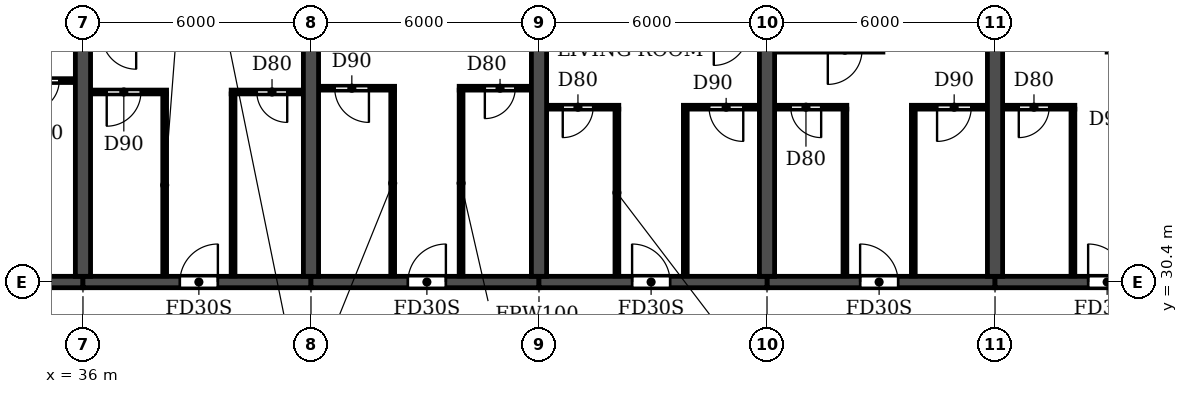
"""IFC4 building model, lengths in metres.
Left out: names, types, materials, properties, quantities, classifications, styles, units other than length and angle.
Written with IfcOpenShell. Run it as: python <this file> out.ifc"""

import sys

from ifc_helpers import new_model, si_unit, direction, frame, frame_2d, origin, place, context, subcontext, project, spatial, rectangle, extrude, element, fill, save


model = new_model("IFC4")
c1 = context("Model", 3, precision=1e-05, world=origin(), true_north=direction((0.0, 1.0)))
c2 = subcontext(c1, "Body", "Model", "MODEL_VIEW")
j1 = project(units=[si_unit("LENGTHUNIT", "METRE"), si_unit("PLANEANGLEUNIT", "RADIAN")], contexts=[c1])
p1 = place(None, origin())
s1 = spatial("IfcSite", under=j1, at=p1, CompositionType="ELEMENT")
p2 = place(p1, origin())
s2 = spatial("IfcBuilding", under=s1, at=p2, CompositionType="ELEMENT")
p3 = place(p2, frame((0.0, 0.0, 26.7)))
s3 = spatial("IfcBuildingStorey", under=s2, at=p3, CompositionType="ELEMENT", Elevation=26.7)
for number, where, z_axis, x_axis in (
    (1, (36.0, 30.55, 0.0), (0.0, 0.0, 1.0), (0.0, 1.0, 0.0)),
    (2, (42.0, 30.55, 0.0), (0.0, 0.0, 1.0), (0.0, 1.0, 0.0)),
    (3, (48.0, 30.55, 0.0), (0.0, 0.0, 1.0), (0.0, 1.0, 0.0)),
    (4, (54.0, 30.55, 0.0), (0.0, 0.0, 1.0), (0.0, 1.0, 0.0)),
    (5, (60.0, 30.55, 0.0), (0.0, 0.0, 1.0), (0.0, 1.0, 0.0)),
):
    element("IfcWall", number, at=place(p3, frame(where, z_axis=z_axis, x_axis=x_axis)), inside=s3, PredefinedType="SHEAR", context=c2, shape_type="SweptSolid", body=[
        extrude(rectangle(XDim=14.05, YDim=0.4, at=frame_2d((7.025, 0.0))), origin(), (0.0, 0.0, 1.0), 3.05),
    ])
p4 = place(p3, frame((30.0, 30.4, 0.0), z_axis=(0.0, 0.0, 1.0), x_axis=(1.0, 0.0, 0.0)))
e6 = element("IfcWall", 6, at=p4, inside=s3, PredefinedType="SHEAR", context=c2, shape_type="SweptSolid", body=[
    extrude(rectangle(XDim=6.0, YDim=0.3, at=frame_2d((3.0, 0.0))), origin(), (0.0, 0.0, 1.0), 2.45),
])
p5 = place(p4, frame((2.55, 0.0, 0.0)))
e7 = element("IfcOpeningElement", 7, at=p5, cuts=e6, PredefinedType="OPENING", context=c2, shape_type="SweptSolid", body=[
    extrude(rectangle(XDim=1.0, YDim=2.1, at=frame_2d((0.5, 1.05))), frame((0.0, 0.16, 0.0), z_axis=(0.0, -1.0, 0.0), x_axis=(1.0, 0.0, 0.0)), (0.0, 0.0, 1.0), 0.32),
])
p6 = place(p3, frame((36.0, 30.4, 0.0), z_axis=(0.0, 0.0, 1.0), x_axis=(1.0, 0.0, 0.0)))
e8 = element("IfcWall", 8, at=p6, inside=s3, PredefinedType="SHEAR", context=c2, shape_type="SweptSolid", body=[
    extrude(rectangle(XDim=6.0, YDim=0.3, at=frame_2d((3.0, 0.0))), origin(), (0.0, 0.0, 1.0), 2.45),
])
p7 = place(p6, frame((2.55, 0.0, 0.0)))
e9 = element("IfcOpeningElement", 9, at=p7, cuts=e8, PredefinedType="OPENING", context=c2, shape_type="SweptSolid", body=[
    extrude(rectangle(XDim=1.0, YDim=2.1, at=frame_2d((0.5, 1.05))), frame((0.0, 0.16, 0.0), z_axis=(0.0, -1.0, 0.0), x_axis=(1.0, 0.0, 0.0)), (0.0, 0.0, 1.0), 0.32),
])
p8 = place(p3, frame((42.0, 30.4, 0.0), z_axis=(0.0, 0.0, 1.0), x_axis=(1.0, 0.0, 0.0)))
e10 = element("IfcWall", 10, at=p8, inside=s3, PredefinedType="SHEAR", context=c2, shape_type="SweptSolid", body=[
    extrude(rectangle(XDim=6.0, YDim=0.3, at=frame_2d((3.0, 0.0))), origin(), (0.0, 0.0, 1.0), 2.45),
])
p9 = place(p8, frame((2.55, 0.0, 0.0)))
e11 = element("IfcOpeningElement", 11, at=p9, cuts=e10, PredefinedType="OPENING", context=c2, shape_type="SweptSolid", body=[
    extrude(rectangle(XDim=1.0, YDim=2.1, at=frame_2d((0.5, 1.05))), frame((0.0, 0.16, 0.0), z_axis=(0.0, -1.0, 0.0), x_axis=(1.0, 0.0, 0.0)), (0.0, 0.0, 1.0), 0.32),
])
p10 = place(p3, frame((48.0, 30.4, 0.0), z_axis=(0.0, 0.0, 1.0), x_axis=(1.0, 0.0, 0.0)))
e12 = element("IfcWall", 12, at=p10, inside=s3, PredefinedType="SHEAR", context=c2, shape_type="SweptSolid", body=[
    extrude(rectangle(XDim=6.0, YDim=0.3, at=frame_2d((3.0, 0.0))), origin(), (0.0, 0.0, 1.0), 2.45),
])
p11 = place(p10, frame((2.45, 0.0, 0.0)))
e13 = element("IfcOpeningElement", 13, at=p11, cuts=e12, PredefinedType="OPENING", context=c2, shape_type="SweptSolid", body=[
    extrude(rectangle(XDim=1.0, YDim=2.1, at=frame_2d((0.5, 1.05))), frame((0.0, 0.16, 0.0), z_axis=(0.0, -1.0, 0.0), x_axis=(1.0, 0.0, 0.0)), (0.0, 0.0, 1.0), 0.32),
])
p12 = place(p3, frame((54.0, 30.4, 0.0), z_axis=(0.0, 0.0, 1.0), x_axis=(1.0, 0.0, 0.0)))
e14 = element("IfcWall", 14, at=p12, inside=s3, PredefinedType="SHEAR", context=c2, shape_type="SweptSolid", body=[
    extrude(rectangle(XDim=6.0, YDim=0.3, at=frame_2d((3.0, 0.0))), origin(), (0.0, 0.0, 1.0), 2.45),
])
p13 = place(p12, frame((2.45, 0.0, 0.0)))
e15 = element("IfcOpeningElement", 15, at=p13, cuts=e14, PredefinedType="OPENING", context=c2, shape_type="SweptSolid", body=[
    extrude(rectangle(XDim=1.0, YDim=2.1, at=frame_2d((0.5, 1.05))), frame((0.0, 0.16, 0.0), z_axis=(0.0, -1.0, 0.0), x_axis=(1.0, 0.0, 0.0)), (0.0, 0.0, 1.0), 0.32),
])
p14 = place(p3, frame((60.0, 30.4, 0.0), z_axis=(0.0, 0.0, 1.0), x_axis=(1.0, 0.0, 0.0)))
e16 = element("IfcWall", 16, at=p14, inside=s3, PredefinedType="SHEAR", context=c2, shape_type="SweptSolid", body=[
    extrude(rectangle(XDim=6.0, YDim=0.3, at=frame_2d((3.0, 0.0))), origin(), (0.0, 0.0, 1.0), 2.45),
])
p15 = place(p14, frame((2.45, 0.0, 0.0)))
e17 = element("IfcOpeningElement", 17, at=p15, cuts=e16, PredefinedType="OPENING", context=c2, shape_type="SweptSolid", body=[
    extrude(rectangle(XDim=1.0, YDim=2.1, at=frame_2d((0.5, 1.05))), frame((0.0, 0.16, 0.0), z_axis=(0.0, -1.0, 0.0), x_axis=(1.0, 0.0, 0.0)), (0.0, 0.0, 1.0), 0.32),
])
p16 = place(p3, frame((48.21, 35.0, 0.0), z_axis=(0.0, 0.0, 1.0), x_axis=(1.0, 0.0, 0.0)))
e18 = element("IfcWall", 18, at=p16, inside=s3, PredefinedType="PARTITIONING", context=c2, shape_type="SweptSolid", body=[
    extrude(rectangle(XDim=1.89, YDim=0.1, at=frame_2d((0.945, 0.0))), origin(), (0.0, 0.0, 1.0), 3.05),
])
p17 = place(p16, frame((0.415, 0.0, 0.0)))
e19 = element("IfcOpeningElement", 19, at=p17, cuts=e18, PredefinedType="OPENING", context=c2, shape_type="SweptSolid", body=[
    extrude(rectangle(XDim=0.8, YDim=2.1, at=frame_2d((0.4, 1.05))), frame((0.0, 0.06, 0.0), z_axis=(0.0, -1.0, 0.0), x_axis=(1.0, 0.0, 0.0)), (0.0, 0.0, 1.0), 0.12),
])
p18 = place(p3, frame((51.8, 35.0, 0.0), z_axis=(0.0, 0.0, 1.0), x_axis=(1.0, 0.0, 0.0)))
e20 = element("IfcWall", 20, at=p18, inside=s3, PredefinedType="PARTITIONING", context=c2, shape_type="SweptSolid", body=[
    extrude(rectangle(XDim=1.99, YDim=0.1, at=frame_2d((0.995, 0.0))), origin(), (0.0, 0.0, 1.0), 3.05),
])
p19 = place(p18, frame((0.675, 0.0, 0.0)))
e21 = element("IfcOpeningElement", 21, at=p19, cuts=e20, PredefinedType="OPENING", context=c2, shape_type="SweptSolid", body=[
    extrude(rectangle(XDim=0.9, YDim=2.1, at=frame_2d((0.45, 1.05))), frame((0.0, 0.06, 0.0), z_axis=(0.0, -1.0, 0.0), x_axis=(1.0, 0.0, 0.0)), (0.0, 0.0, 1.0), 0.12),
])
p20 = place(p3, frame((54.21, 35.0, 0.0), z_axis=(0.0, 0.0, 1.0), x_axis=(1.0, 0.0, 0.0)))
e22 = element("IfcWall", 22, at=p20, inside=s3, PredefinedType="PARTITIONING", context=c2, shape_type="SweptSolid", body=[
    extrude(rectangle(XDim=1.89, YDim=0.1, at=frame_2d((0.945, 0.0))), origin(), (0.0, 0.0, 1.0), 3.05),
])
p21 = place(p20, frame((0.415, 0.0, 0.0)))
e23 = element("IfcOpeningElement", 23, at=p21, cuts=e22, PredefinedType="OPENING", context=c2, shape_type="SweptSolid", body=[
    extrude(rectangle(XDim=0.8, YDim=2.1, at=frame_2d((0.4, 1.05))), frame((0.0, 0.06, 0.0), z_axis=(0.0, -1.0, 0.0), x_axis=(1.0, 0.0, 0.0)), (0.0, 0.0, 1.0), 0.12),
])
p22 = place(p3, frame((57.8, 35.0, 0.0), z_axis=(0.0, 0.0, 1.0), x_axis=(1.0, 0.0, 0.0)))
e24 = element("IfcWall", 24, at=p22, inside=s3, PredefinedType="PARTITIONING", context=c2, shape_type="SweptSolid", body=[
    extrude(rectangle(XDim=1.99, YDim=0.1, at=frame_2d((0.995, 0.0))), origin(), (0.0, 0.0, 1.0), 3.05),
])
p23 = place(p22, frame((0.675, 0.0, 0.0)))
e25 = element("IfcOpeningElement", 25, at=p23, cuts=e24, PredefinedType="OPENING", context=c2, shape_type="SweptSolid", body=[
    extrude(rectangle(XDim=0.9, YDim=2.1, at=frame_2d((0.45, 1.05))), frame((0.0, 0.06, 0.0), z_axis=(0.0, -1.0, 0.0), x_axis=(1.0, 0.0, 0.0)), (0.0, 0.0, 1.0), 0.12),
])
p24 = place(p3, frame((60.21, 35.0, 0.0), z_axis=(0.0, 0.0, 1.0), x_axis=(1.0, 0.0, 0.0)))
e26 = element("IfcWall", 26, at=p24, inside=s3, PredefinedType="PARTITIONING", context=c2, shape_type="SweptSolid", body=[
    extrude(rectangle(XDim=1.89, YDim=0.1, at=frame_2d((0.945, 0.0))), origin(), (0.0, 0.0, 1.0), 3.05),
])
p25 = place(p24, frame((0.415, 0.0, 0.0)))
e27 = element("IfcOpeningElement", 27, at=p25, cuts=e26, PredefinedType="OPENING", context=c2, shape_type="SweptSolid", body=[
    extrude(rectangle(XDim=0.8, YDim=2.1, at=frame_2d((0.4, 1.05))), frame((0.0, 0.06, 0.0), z_axis=(0.0, -1.0, 0.0), x_axis=(1.0, 0.0, 0.0)), (0.0, 0.0, 1.0), 0.12),
])
p26 = place(p3, frame((36.21, 35.4, 0.0), z_axis=(0.0, 0.0, 1.0), x_axis=(1.0, 0.0, 0.0)))
e28 = element("IfcWall", 28, at=p26, inside=s3, PredefinedType="PARTITIONING", context=c2, shape_type="SweptSolid", body=[
    extrude(rectangle(XDim=1.99, YDim=0.1, at=frame_2d((0.995, 0.0))), origin(), (0.0, 0.0, 1.0), 3.05),
])
p27 = place(p26, frame((0.415, 0.0, 0.0)))
e29 = element("IfcOpeningElement", 29, at=p27, cuts=e28, PredefinedType="OPENING", context=c2, shape_type="SweptSolid", body=[
    extrude(rectangle(XDim=0.9, YDim=2.1, at=frame_2d((0.45, 1.05))), frame((0.0, 0.06, 0.0), z_axis=(0.0, -1.0, 0.0), x_axis=(1.0, 0.0, 0.0)), (0.0, 0.0, 1.0), 0.12),
])
p28 = place(p3, frame((39.9, 35.4, 0.0), z_axis=(0.0, 0.0, 1.0), x_axis=(1.0, 0.0, 0.0)))
e30 = element("IfcWall", 30, at=p28, inside=s3, PredefinedType="PARTITIONING", context=c2, shape_type="SweptSolid", body=[
    extrude(rectangle(XDim=1.89, YDim=0.1, at=frame_2d((0.945, 0.0))), origin(), (0.0, 0.0, 1.0), 3.05),
])
p29 = place(p28, frame((0.675, 0.0, 0.0)))
e31 = element("IfcOpeningElement", 31, at=p29, cuts=e30, PredefinedType="OPENING", context=c2, shape_type="SweptSolid", body=[
    extrude(rectangle(XDim=0.8, YDim=2.1, at=frame_2d((0.4, 1.05))), frame((0.0, 0.06, 0.0), z_axis=(0.0, -1.0, 0.0), x_axis=(1.0, 0.0, 0.0)), (0.0, 0.0, 1.0), 0.12),
])
p30 = place(p3, frame((42.21, 35.5, 0.0), z_axis=(0.0, 0.0, 1.0), x_axis=(1.0, 0.0, 0.0)))
e32 = element("IfcWall", 32, at=p30, inside=s3, PredefinedType="PARTITIONING", context=c2, shape_type="SweptSolid", body=[
    extrude(rectangle(XDim=1.99, YDim=0.1, at=frame_2d((0.995, 0.0))), origin(), (0.0, 0.0, 1.0), 3.05),
])
p31 = place(p30, frame((0.415, 0.0, 0.0)))
e33 = element("IfcOpeningElement", 33, at=p31, cuts=e32, PredefinedType="OPENING", context=c2, shape_type="SweptSolid", body=[
    extrude(rectangle(XDim=0.9, YDim=2.1, at=frame_2d((0.45, 1.05))), frame((0.0, 0.06, 0.0), z_axis=(0.0, -1.0, 0.0), x_axis=(1.0, 0.0, 0.0)), (0.0, 0.0, 1.0), 0.12),
])
p32 = place(p3, frame((45.9, 35.5, 0.0), z_axis=(0.0, 0.0, 1.0), x_axis=(1.0, 0.0, 0.0)))
e34 = element("IfcWall", 34, at=p32, inside=s3, PredefinedType="PARTITIONING", context=c2, shape_type="SweptSolid", body=[
    extrude(rectangle(XDim=1.89, YDim=0.1, at=frame_2d((0.945, 0.0))), origin(), (0.0, 0.0, 1.0), 3.05),
])
p33 = place(p32, frame((0.675, 0.0, 0.0)))
e35 = element("IfcOpeningElement", 35, at=p33, cuts=e34, PredefinedType="OPENING", context=c2, shape_type="SweptSolid", body=[
    extrude(rectangle(XDim=0.8, YDim=2.1, at=frame_2d((0.4, 1.05))), frame((0.0, 0.06, 0.0), z_axis=(0.0, -1.0, 0.0), x_axis=(1.0, 0.0, 0.0)), (0.0, 0.0, 1.0), 0.12),
])
p34 = place(p3, frame((33.9, 35.7, 0.0), z_axis=(0.0, 0.0, 1.0), x_axis=(1.0, 0.0, 0.0)))
e36 = element("IfcWall", 36, at=p34, inside=s3, PredefinedType="PARTITIONING", context=c2, shape_type="SweptSolid", body=[
    extrude(rectangle(XDim=1.89, YDim=0.1, at=frame_2d((0.945, 0.0))), origin(), (0.0, 0.0, 1.0), 3.05),
])
p35 = place(p34, frame((0.675, 0.0, 0.0)))
e37 = element("IfcOpeningElement", 37, at=p35, cuts=e36, PredefinedType="OPENING", context=c2, shape_type="SweptSolid", body=[
    extrude(rectangle(XDim=0.8, YDim=2.1, at=frame_2d((0.4, 1.05))), frame((0.0, 0.06, 0.0), z_axis=(0.0, -1.0, 0.0), x_axis=(1.0, 0.0, 0.0)), (0.0, 0.0, 1.0), 0.12),
])
for number, where, z_axis, x_axis in (
    (38, (38.15, 30.56, 0.0), (0.0, 0.0, 1.0), (0.0, 1.0, 0.0)),
    (39, (39.95, 30.56, 0.0), (0.0, 0.0, 1.0), (0.0, 1.0, 0.0)),
):
    element("IfcWall", number, at=place(p3, frame(where, z_axis=z_axis, x_axis=x_axis)), inside=s3, PredefinedType="PARTITIONING", context=c2, shape_type="SweptSolid", body=[
        extrude(rectangle(XDim=4.79, YDim=0.1, at=frame_2d((2.395, 0.0))), origin(), (0.0, 0.0, 1.0), 3.05),
    ])
for number, where, z_axis, x_axis in (
    (40, (44.15, 30.56, 0.0), (0.0, 0.0, 1.0), (0.0, 1.0, 0.0)),
    (41, (45.95, 30.56, 0.0), (0.0, 0.0, 1.0), (0.0, 1.0, 0.0)),
):
    element("IfcWall", number, at=place(p3, frame(where, z_axis=z_axis, x_axis=x_axis)), inside=s3, PredefinedType="PARTITIONING", context=c2, shape_type="SweptSolid", body=[
        extrude(rectangle(XDim=4.89, YDim=0.1, at=frame_2d((2.445, 0.0))), origin(), (0.0, 0.0, 1.0), 3.05),
    ])
for number, where, z_axis, x_axis in (
    (42, (50.05, 30.56, 0.0), (0.0, 0.0, 1.0), (0.0, 1.0, 0.0)),
    (43, (51.85, 30.56, 0.0), (0.0, 0.0, 1.0), (0.0, 1.0, 0.0)),
    (44, (56.05, 30.56, 0.0), (0.0, 0.0, 1.0), (0.0, 1.0, 0.0)),
    (45, (57.85, 30.56, 0.0), (0.0, 0.0, 1.0), (0.0, 1.0, 0.0)),
    (46, (62.05, 30.56, 0.0), (0.0, 0.0, 1.0), (0.0, 1.0, 0.0)),
):
    element("IfcWall", number, at=place(p3, frame(where, z_axis=z_axis, x_axis=x_axis)), inside=s3, PredefinedType="PARTITIONING", context=c2, shape_type="SweptSolid", body=[
        extrude(rectangle(XDim=4.39, YDim=0.1, at=frame_2d((2.195, 0.0))), origin(), (0.0, 0.0, 1.0), 3.05),
    ])
p36 = place(p35, frame((0.8, 0.0, 0.0), z_axis=(0.0, 0.0, 1.0), x_axis=(-1.0, 0.0, 0.0)))
e47 = element("IfcDoor", 47, at=p36, inside=s3, OperationType="SINGLE_SWING_RIGHT", PredefinedType="DOOR", context=c2, shape_type="SweptSolid", body=[
    extrude(rectangle(XDim=0.8, YDim=2.1, at=frame_2d((0.4, 1.05))), frame((0.0, 0.025, 0.0), z_axis=(0.0, -1.0, 0.0), x_axis=(1.0, 0.0, 0.0)), (0.0, 0.0, 1.0), 0.05),
])
fill(e37, e47)
p37 = place(p27, frame((0.9, 0.0, 0.0), z_axis=(0.0, 0.0, 1.0), x_axis=(-1.0, 0.0, 0.0)))
e48 = element("IfcDoor", 48, at=p37, inside=s3, OperationType="SINGLE_SWING_RIGHT", PredefinedType="DOOR", context=c2, shape_type="SweptSolid", body=[
    extrude(rectangle(XDim=0.9, YDim=2.1, at=frame_2d((0.45, 1.05))), frame((0.0, 0.025, 0.0), z_axis=(0.0, -1.0, 0.0), x_axis=(1.0, 0.0, 0.0)), (0.0, 0.0, 1.0), 0.05),
])
fill(e29, e48)
p38 = place(p7, origin())
e49 = element("IfcDoor", 49, at=p38, inside=s3, OperationType="SINGLE_SWING_RIGHT", PredefinedType="DOOR", context=c2, shape_type="SweptSolid", body=[
    extrude(rectangle(XDim=1.0, YDim=2.1, at=frame_2d((0.5, 1.05))), frame((0.0, 0.025, 0.0), z_axis=(0.0, -1.0, 0.0), x_axis=(1.0, 0.0, 0.0)), (0.0, 0.0, 1.0), 0.05),
])
fill(e9, e49)
p39 = place(p29, frame((0.8, 0.0, 0.0), z_axis=(0.0, 0.0, 1.0), x_axis=(-1.0, 0.0, 0.0)))
e50 = element("IfcDoor", 50, at=p39, inside=s3, OperationType="SINGLE_SWING_LEFT", PredefinedType="DOOR", context=c2, shape_type="SweptSolid", body=[
    extrude(rectangle(XDim=0.8, YDim=2.1, at=frame_2d((0.4, 1.05))), frame((0.0, 0.025, 0.0), z_axis=(0.0, -1.0, 0.0), x_axis=(1.0, 0.0, 0.0)), (0.0, 0.0, 1.0), 0.05),
])
fill(e31, e50)
p40 = place(p31, frame((0.9, 0.0, 0.0), z_axis=(0.0, 0.0, 1.0), x_axis=(-1.0, 0.0, 0.0)))
e51 = element("IfcDoor", 51, at=p40, inside=s3, OperationType="SINGLE_SWING_LEFT", PredefinedType="DOOR", context=c2, shape_type="SweptSolid", body=[
    extrude(rectangle(XDim=0.9, YDim=2.1, at=frame_2d((0.45, 1.05))), frame((0.0, 0.025, 0.0), z_axis=(0.0, -1.0, 0.0), x_axis=(1.0, 0.0, 0.0)), (0.0, 0.0, 1.0), 0.05),
])
fill(e33, e51)
p41 = place(p9, origin())
e52 = element("IfcDoor", 52, at=p41, inside=s3, OperationType="SINGLE_SWING_RIGHT", PredefinedType="DOOR", context=c2, shape_type="SweptSolid", body=[
    extrude(rectangle(XDim=1.0, YDim=2.1, at=frame_2d((0.5, 1.05))), frame((0.0, 0.025, 0.0), z_axis=(0.0, -1.0, 0.0), x_axis=(1.0, 0.0, 0.0)), (0.0, 0.0, 1.0), 0.05),
])
fill(e11, e52)
p42 = place(p33, frame((0.8, 0.0, 0.0), z_axis=(0.0, 0.0, 1.0), x_axis=(-1.0, 0.0, 0.0)))
e53 = element("IfcDoor", 53, at=p42, inside=s3, OperationType="SINGLE_SWING_RIGHT", PredefinedType="DOOR", context=c2, shape_type="SweptSolid", body=[
    extrude(rectangle(XDim=0.8, YDim=2.1, at=frame_2d((0.4, 1.05))), frame((0.0, 0.025, 0.0), z_axis=(0.0, -1.0, 0.0), x_axis=(1.0, 0.0, 0.0)), (0.0, 0.0, 1.0), 0.05),
])
fill(e35, e53)
p43 = place(p17, frame((0.8, 0.0, 0.0), z_axis=(0.0, 0.0, 1.0), x_axis=(-1.0, 0.0, 0.0)))
e54 = element("IfcDoor", 54, at=p43, inside=s3, OperationType="SINGLE_SWING_RIGHT", PredefinedType="DOOR", context=c2, shape_type="SweptSolid", body=[
    extrude(rectangle(XDim=0.8, YDim=2.1, at=frame_2d((0.4, 1.05))), frame((0.0, 0.025, 0.0), z_axis=(0.0, -1.0, 0.0), x_axis=(1.0, 0.0, 0.0)), (0.0, 0.0, 1.0), 0.05),
])
fill(e19, e54)
p44 = place(p11, origin())
e55 = element("IfcDoor", 55, at=p44, inside=s3, OperationType="SINGLE_SWING_LEFT", PredefinedType="DOOR", context=c2, shape_type="SweptSolid", body=[
    extrude(rectangle(XDim=1.0, YDim=2.1, at=frame_2d((0.5, 1.05))), frame((0.0, 0.025, 0.0), z_axis=(0.0, -1.0, 0.0), x_axis=(1.0, 0.0, 0.0)), (0.0, 0.0, 1.0), 0.05),
])
fill(e13, e55)
p45 = place(p19, frame((0.9, 0.0, 0.0), z_axis=(0.0, 0.0, 1.0), x_axis=(-1.0, 0.0, 0.0)))
e56 = element("IfcDoor", 56, at=p45, inside=s3, OperationType="SINGLE_SWING_LEFT", PredefinedType="DOOR", context=c2, shape_type="SweptSolid", body=[
    extrude(rectangle(XDim=0.9, YDim=2.1, at=frame_2d((0.45, 1.05))), frame((0.0, 0.025, 0.0), z_axis=(0.0, -1.0, 0.0), x_axis=(1.0, 0.0, 0.0)), (0.0, 0.0, 1.0), 0.05),
])
fill(e21, e56)
p46 = place(p21, frame((0.8, 0.0, 0.0), z_axis=(0.0, 0.0, 1.0), x_axis=(-1.0, 0.0, 0.0)))
e57 = element("IfcDoor", 57, at=p46, inside=s3, OperationType="SINGLE_SWING_LEFT", PredefinedType="DOOR", context=c2, shape_type="SweptSolid", body=[
    extrude(rectangle(XDim=0.8, YDim=2.1, at=frame_2d((0.4, 1.05))), frame((0.0, 0.025, 0.0), z_axis=(0.0, -1.0, 0.0), x_axis=(1.0, 0.0, 0.0)), (0.0, 0.0, 1.0), 0.05),
])
fill(e23, e57)
p47 = place(p13, origin())
e58 = element("IfcDoor", 58, at=p47, inside=s3, OperationType="SINGLE_SWING_LEFT", PredefinedType="DOOR", context=c2, shape_type="SweptSolid", body=[
    extrude(rectangle(XDim=1.0, YDim=2.1, at=frame_2d((0.5, 1.05))), frame((0.0, 0.025, 0.0), z_axis=(0.0, -1.0, 0.0), x_axis=(1.0, 0.0, 0.0)), (0.0, 0.0, 1.0), 0.05),
])
fill(e15, e58)
p48 = place(p23, frame((0.9, 0.0, 0.0), z_axis=(0.0, 0.0, 1.0), x_axis=(-1.0, 0.0, 0.0)))
e59 = element("IfcDoor", 59, at=p48, inside=s3, OperationType="SINGLE_SWING_RIGHT", PredefinedType="DOOR", context=c2, shape_type="SweptSolid", body=[
    extrude(rectangle(XDim=0.9, YDim=2.1, at=frame_2d((0.45, 1.05))), frame((0.0, 0.025, 0.0), z_axis=(0.0, -1.0, 0.0), x_axis=(1.0, 0.0, 0.0)), (0.0, 0.0, 1.0), 0.05),
])
fill(e25, e59)
p49 = place(p25, frame((0.8, 0.0, 0.0), z_axis=(0.0, 0.0, 1.0), x_axis=(-1.0, 0.0, 0.0)))
e60 = element("IfcDoor", 60, at=p49, inside=s3, OperationType="SINGLE_SWING_RIGHT", PredefinedType="DOOR", context=c2, shape_type="SweptSolid", body=[
    extrude(rectangle(XDim=0.8, YDim=2.1, at=frame_2d((0.4, 1.05))), frame((0.0, 0.025, 0.0), z_axis=(0.0, -1.0, 0.0), x_axis=(1.0, 0.0, 0.0)), (0.0, 0.0, 1.0), 0.05),
])
fill(e27, e60)
p50 = place(p15, origin())
e61 = element("IfcDoor", 61, at=p50, inside=s3, OperationType="SINGLE_SWING_LEFT", PredefinedType="DOOR", context=c2, shape_type="SweptSolid", body=[
    extrude(rectangle(XDim=1.0, YDim=2.1, at=frame_2d((0.5, 1.05))), frame((0.0, 0.025, 0.0), z_axis=(0.0, -1.0, 0.0), x_axis=(1.0, 0.0, 0.0)), (0.0, 0.0, 1.0), 0.05),
])
fill(e17, e61)
save(model, sys.argv[1])
